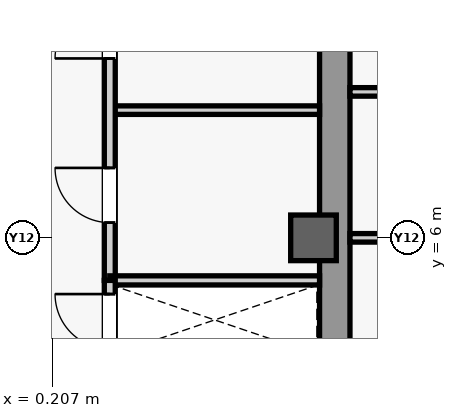
"""IFC4 building model, lengths in metres.
Left out: names, types, materials, properties, quantities, classifications, styles, units other than length and angle.
Written with IfcOpenShell. Run it as: python <this file> out.ifc"""

import sys

from ifc_helpers import new_model, si_unit, direction, frame, frame_2d, origin, origin_2d, place, context, subcontext, project, spatial, rectangle, extrude, source, transform, mapped, element, fill, save


model = new_model("IFC4")
c1 = context("Model", 3, precision=1e-05, world=origin(), true_north=direction((0.0, 1.0)))
c2 = subcontext(c1, "Body", "Model", "MODEL_VIEW")
j1 = project(units=[si_unit("LENGTHUNIT", "METRE"), si_unit("PLANEANGLEUNIT", "RADIAN")], contexts=[c1])
p1 = place(None, origin())
s1 = spatial("IfcSite", under=j1, at=p1, CompositionType="ELEMENT")
p2 = place(p1, origin())
s2 = spatial("IfcBuilding", under=s1, at=p2, CompositionType="ELEMENT")
p3 = place(p2, frame((0.0, 0.0, 277.5)))
s3 = spatial("IfcBuildingStorey", under=s2, at=p3, CompositionType="ELEMENT", Elevation=277.5)
m1 = source(origin(), c2, "Body", "SweptSolid", [
    extrude(rectangle(XDim=21.4, YDim=0.5, at=frame_2d((10.7, 0.0))), origin(), (0.0, 0.0, 1.0), 3.78),
])
p4 = place(p3, frame((4.85, -10.7, 0.0), z_axis=(0.0, 0.0, 1.0), x_axis=(0.0, 1.0, 0.0)))
e1 = element("IfcWall", 1, at=p4, inside=s3, PredefinedType="SHEAR", context=c2, shape_type="MappedRepresentation", body=[
    mapped(m1, transform((0.0, 0.0, 0.0), scale=1.0)),
])
m2 = source(origin(), c2, "Body", "SweptSolid", [
    extrude(rectangle(XDim=0.75, YDim=0.75, at=origin_2d()), origin(), (0.0, 0.0, 1.0), 4.0),
])
p5 = place(p3, frame((4.5, 6.0, 0.0), z_axis=(0.0, 0.0, 1.0), x_axis=(1.0, 0.0, 0.0)))
e2 = element("IfcColumn", 2, at=p5, inside=s3, PredefinedType="COLUMN", context=c2, shape_type="MappedRepresentation", body=[
    mapped(m2, transform((0.0, 0.0, 0.0), scale=1.0)),
])
m3 = source(origin(), c2, "Body", "SweptSolid", [
    extrude(rectangle(XDim=3.15, YDim=0.14, at=frame_2d((1.575, 0.0))), origin(), (0.0, 0.0, 1.0), 3.78),
])
p6 = place(p3, frame((5.1, 8.4, 0.0), z_axis=(0.0, 0.0, 1.0), x_axis=(1.0, 0.0, 0.0)))
e3 = element("IfcWall", 3, at=p6, inside=s3, PredefinedType="PARTITIONING", context=c2, shape_type="MappedRepresentation", body=[
    mapped(m3, transform((0.0, 0.0, 0.0), scale=1.0)),
])
m4 = source(origin(), c2, "Body", "SweptSolid", [
    extrude(rectangle(XDim=0.9, YDim=2.15, at=frame_2d((0.45, 1.075))), frame((0.0, 0.08, 0.0), z_axis=(0.0, -1.0, 0.0), x_axis=(1.0, 0.0, 0.0)), (0.0, 0.0, 1.0), 0.16),
])
p7 = place(p6, frame((1.13, 0.0, 0.0)))
e4 = element("IfcOpeningElement", 4, at=p7, cuts=e3, PredefinedType="OPENING", context=c2, shape_type="MappedRepresentation", body=[
    mapped(m4, transform((0.0, 0.0, 0.0), scale=1.0)),
])
p8 = place(p3, frame((5.1, 6.0, 0.0), z_axis=(0.0, 0.0, 1.0), x_axis=(1.0, 0.0, 0.0)))
e5 = element("IfcWall", 5, at=p8, inside=s3, PredefinedType="PARTITIONING", context=c2, shape_type="MappedRepresentation", body=[
    mapped(m3, transform((0.0, 0.0, 0.0), scale=1.0)),
])
p9 = place(p8, frame((1.13, 0.0, 0.0)))
e6 = element("IfcOpeningElement", 6, at=p9, cuts=e5, PredefinedType="OPENING", context=c2, shape_type="MappedRepresentation", body=[
    mapped(m4, transform((0.0, 0.0, 0.0), scale=1.0)),
])
m5 = source(origin(), c2, "Body", "SweptSolid", [
    extrude(rectangle(XDim=3.45, YDim=0.14, at=frame_2d((1.725, 0.0))), origin(), (0.0, 0.0, 1.0), 3.78),
])
p10 = place(p3, frame((1.15, 8.1, 0.0), z_axis=(0.0, 0.0, 1.0), x_axis=(1.0, 0.0, 0.0)))
e7 = element("IfcWall", 7, at=p10, inside=s3, PredefinedType="PARTITIONING", context=c2, shape_type="MappedRepresentation", body=[
    mapped(m5, transform((0.0, 0.0, 0.0), scale=1.0)),
])
m6 = source(origin(), c2, "Body", "SweptSolid", [
    extrude(rectangle(XDim=5.4, YDim=0.18, at=frame_2d((2.7, 0.0))), origin(), (0.0, 0.0, 1.0), 3.78),
])
p11 = place(p3, frame((1.15, 5.3, 0.0), z_axis=(0.0, 0.0, 1.0), x_axis=(0.0, 1.0, 0.0)))
e8 = element("IfcWall", 8, at=p11, inside=s3, PredefinedType="PARTITIONING", context=c2, shape_type="MappedRepresentation", body=[
    mapped(m6, transform((0.0, 0.0, 0.0), scale=1.0)),
])
m7 = source(origin(), c2, "Body", "SweptSolid", [
    extrude(rectangle(XDim=0.9, YDim=2.15, at=frame_2d((0.45, 1.075))), frame((0.0, 0.1, 0.0), z_axis=(0.0, -1.0, 0.0), x_axis=(1.0, 0.0, 0.0)), (0.0, 0.0, 1.0), 0.2),
])
p12 = place(p11, frame((0.95, 0.0, 0.0)))
e9 = element("IfcOpeningElement", 9, at=p12, cuts=e8, PredefinedType="OPENING", context=c2, shape_type="MappedRepresentation", body=[
    mapped(m7, transform((0.0, 0.0, 0.0), scale=1.0)),
])
p13 = place(p11, frame((3.65, 0.0, 0.0)))
e10 = element("IfcOpeningElement", 10, at=p13, cuts=e8, PredefinedType="OPENING", context=c2, shape_type="MappedRepresentation", body=[
    mapped(m7, transform((0.0, 0.0, 0.0), scale=1.0)),
])
m8 = source(origin(), c2, "Body", "SweptSolid", [
    extrude(rectangle(XDim=3.45, YDim=0.15, at=frame_2d((1.725, 0.0))), origin(), (0.0, 0.0, 1.0), 3.78),
])
p14 = place(p3, frame((1.15, 5.3, 0.0), z_axis=(0.0, 0.0, 1.0), x_axis=(1.0, 0.0, 0.0)))
e11 = element("IfcWall", 11, at=p14, inside=s3, PredefinedType="PARTITIONING", context=c2, shape_type="MappedRepresentation", body=[
    mapped(m8, transform((0.0, 0.0, 0.0), scale=1.0)),
])
m9 = source(origin(), c2, "Body", "SweptSolid", [
    extrude(rectangle(XDim=10.6, YDim=0.18, at=frame_2d((5.3, 0.0))), origin(), (0.0, 0.0, 1.0), 3.78),
])
p15 = place(p3, frame((1.15, -5.3, 0.0), z_axis=(0.0, 0.0, 1.0), x_axis=(0.0, 1.0, 0.0)))
e12 = element("IfcWall", 12, at=p15, inside=s3, PredefinedType="PARTITIONING", context=c2, shape_type="MappedRepresentation", body=[
    mapped(m9, transform((0.0, 0.0, 0.0), scale=1.0)),
])
p16 = place(p15, frame((2.6, 0.0, 0.0)))
e13 = element("IfcOpeningElement", 13, at=p16, cuts=e12, PredefinedType="OPENING", context=c2, shape_type="MappedRepresentation", body=[
    mapped(m7, transform((0.0, 0.0, 0.0), scale=1.0)),
])
p17 = place(p15, frame((7.25, 0.0, 0.0)))
e14 = element("IfcOpeningElement", 14, at=p17, cuts=e12, PredefinedType="OPENING", context=c2, shape_type="MappedRepresentation", body=[
    mapped(m7, transform((0.0, 0.0, 0.0), scale=1.0)),
])
p18 = place(p15, frame((9.475, 0.0, 0.0)))
e15 = element("IfcOpeningElement", 15, at=p18, cuts=e12, PredefinedType="OPENING", context=c2, shape_type="MappedRepresentation", body=[
    mapped(m7, transform((0.0, 0.0, 0.0), scale=1.0)),
])
m10 = source(origin(), c2, "Body", "SweptSolid", [
    extrude(rectangle(XDim=0.9, YDim=2.15, at=frame_2d((0.45, 1.075))), frame((0.0, 0.025, 0.0), z_axis=(0.0, -1.0, 0.0), x_axis=(1.0, 0.0, 0.0)), (0.0, 0.0, 1.0), 0.05),
])
p19 = place(p12, origin())
e16 = element("IfcDoor", 16, at=p19, inside=s3, OperationType="SINGLE_SWING_RIGHT", PredefinedType="DOOR", context=c2, shape_type="MappedRepresentation", body=[
    mapped(m10, transform((0.0, 0.0, 0.0), scale=1.0)),
])
fill(e9, e16)
p20 = place(p13, origin())
e17 = element("IfcDoor", 17, at=p20, inside=s3, OperationType="SINGLE_SWING_LEFT", PredefinedType="DOOR", context=c2, shape_type="MappedRepresentation", body=[
    mapped(m10, transform((0.0, 0.0, 0.0), scale=1.0)),
])
fill(e10, e17)
p21 = place(p18, origin())
e18 = element("IfcDoor", 18, at=p21, inside=s3, OperationType="SINGLE_SWING_RIGHT", PredefinedType="DOOR", context=c2, shape_type="MappedRepresentation", body=[
    mapped(m10, transform((0.0, 0.0, 0.0), scale=1.0)),
])
fill(e15, e18)
save(model, sys.argv[1])
